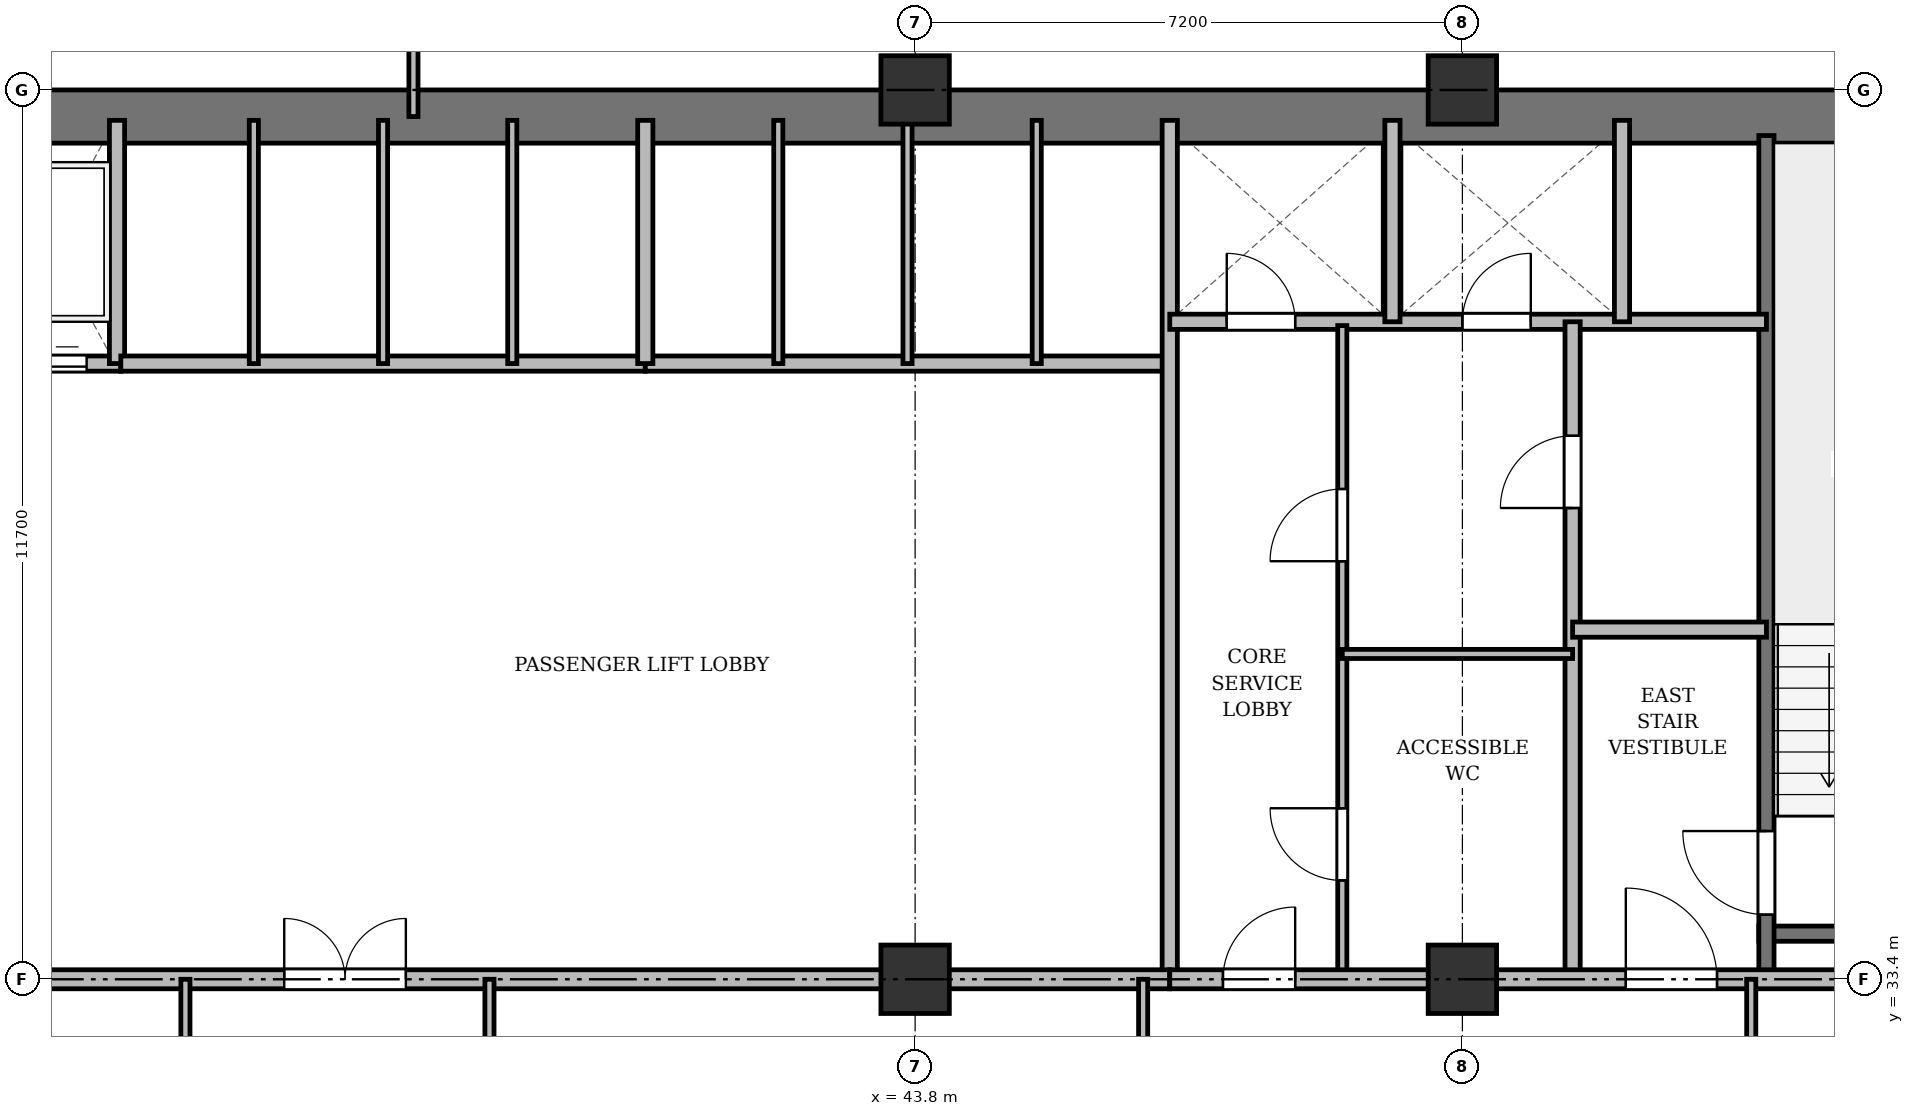
"""IFC4 building model, lengths in metres.
Left out: names, types, materials, properties, quantities, classifications, styles, units other than length and angle.
Written with IfcOpenShell. Run it as: python <this file> out.ifc"""

import sys

from ifc_helpers import new_model, si_unit, direction, frame, frame_2d, origin, origin_2d, place, context, subcontext, project, spatial, rectangle, extrude, source, transform, mapped, element, fill, save


model = new_model("IFC4")
c1 = context("Model", 3, precision=1e-05, world=origin(), true_north=direction((0.0, 1.0)))
c2 = subcontext(c1, "Body", "Model", "MODEL_VIEW")
j1 = project(units=[si_unit("LENGTHUNIT", "METRE"), si_unit("PLANEANGLEUNIT", "RADIAN")], contexts=[c1])
p1 = place(None, origin())
s1 = spatial("IfcSite", under=j1, at=p1, CompositionType="ELEMENT")
p2 = place(p1, origin())
s2 = spatial("IfcBuilding", under=s1, at=p2, CompositionType="ELEMENT")
p3 = place(p2, frame((0.0, 0.0, 66.7)))
s3 = spatial("IfcBuildingStorey", under=s2, at=p3, CompositionType="ELEMENT", Elevation=66.7)
m1 = source(origin(), c2, "Body", "SweptSolid", [
    extrude(rectangle(XDim=0.9, YDim=0.9, at=origin_2d()), origin(), (0.0, 0.0, 1.0), 3.6),
])
for number, where, z_axis, x_axis in (
    (1, (43.8, 33.4, 0.0), (0.0, 0.0, 1.0), (1.0, 0.0, 0.0)),
    (2, (43.8, 45.1, 0.0), (0.0, 0.0, 1.0), (1.0, 0.0, 0.0)),
    (3, (51.0, 33.4, 0.0), (0.0, 0.0, 1.0), (1.0, 0.0, 0.0)),
    (4, (51.0, 45.1, 0.0), (0.0, 0.0, 1.0), (1.0, 0.0, 0.0)),
):
    element("IfcColumn", number, at=place(p3, frame(where, z_axis=z_axis, x_axis=x_axis)), inside=s3, PredefinedType="COLUMN", context=c2, shape_type="MappedRepresentation", body=[
        mapped(m1, transform((0.0, 0.0, 0.0), x_axis=(1.0, 0.0, 0.0), y_axis=(0.0, 1.0, 0.0), z_axis=(0.0, 0.0, 1.0), scale=1.0)),
    ])
p4 = place(p3, frame((15.5, 44.75, 0.0), z_axis=(0.0, 0.0, 1.0), x_axis=(1.0, 0.0, 0.0)))
e5 = element("IfcWall", 5, at=p4, inside=s3, PredefinedType="SHEAR", context=c2, shape_type="SweptSolid", body=[
    extrude(rectangle(XDim=43.4, YDim=0.7, at=frame_2d((21.7, 0.0))), origin(), (0.0, 0.0, 1.0), 3.34),
])
p5 = place(p3, frame((54.9, 34.0, 0.0), z_axis=(0.0, 0.0, 1.0), x_axis=(1.0, 0.0, 0.0)))
e6 = element("IfcWall", 6, at=p5, inside=s3, PredefinedType="SHEAR", context=c2, shape_type="SweptSolid", body=[
    extrude(rectangle(XDim=3.4, YDim=0.2, at=frame_2d((1.7, 0.0))), origin(), (0.0, 0.0, 1.0), 3.34),
])
p6 = place(p3, frame((55.0, 33.4, 0.0), z_axis=(0.0, 0.0, 1.0), x_axis=(0.0, 1.0, 0.0)))
e7 = element("IfcWall", 7, at=p6, inside=s3, PredefinedType="SHEAR", context=c2, shape_type="SweptSolid", body=[
    extrude(rectangle(XDim=11.1, YDim=0.2, at=frame_2d((5.55, 0.0))), origin(), (0.0, 0.0, 1.0), 3.34),
])
p7 = place(p6, frame((0.85, 0.0, 0.0)))
e8 = element("IfcOpeningElement", 8, at=p7, cuts=e7, PredefinedType="OPENING", context=c2, shape_type="SweptSolid", body=[
    extrude(rectangle(XDim=1.1, YDim=2.15, at=frame_2d((0.55, 1.075))), frame((0.0, 0.11, 0.0), z_axis=(0.0, -1.0, 0.0), x_axis=(1.0, 0.0, 0.0)), (0.0, 0.0, 1.0), 0.22),
])
p8 = place(p3, frame((26.4, 41.5, 0.0), z_axis=(0.0, 0.0, 1.0), x_axis=(1.0, 0.0, 0.0)))
e9 = element("IfcWall", 9, at=p8, inside=s3, PredefinedType="SOLIDWALL", context=c2, shape_type="SweptSolid", body=[
    extrude(rectangle(XDim=6.95, YDim=0.2, at=frame_2d((3.475, 0.0))), origin(), (0.0, 0.0, 1.0), 3.34),
])
p9 = place(p8, frame((0.35, 0.0, 0.0)))
e10 = element("IfcOpeningElement", 10, at=p9, cuts=e9, PredefinedType="OPENING", context=c2, shape_type="SweptSolid", body=[
    extrude(rectangle(XDim=1.05, YDim=2.15, at=frame_2d((0.525, 1.075))), frame((0.0, 0.11, 0.0), z_axis=(0.0, -1.0, 0.0), x_axis=(1.0, 0.0, 0.0)), (0.0, 0.0, 1.0), 0.22),
])
p10 = place(p8, frame((2.05, 0.0, 0.0)))
e11 = element("IfcOpeningElement", 11, at=p10, cuts=e9, PredefinedType="OPENING", context=c2, shape_type="SweptSolid", body=[
    extrude(rectangle(XDim=1.05, YDim=2.15, at=frame_2d((0.525, 1.075))), frame((0.0, 0.11, 0.0), z_axis=(0.0, -1.0, 0.0), x_axis=(1.0, 0.0, 0.0)), (0.0, 0.0, 1.0), 0.22),
])
p11 = place(p8, frame((3.75, 0.0, 0.0)))
e12 = element("IfcOpeningElement", 12, at=p11, cuts=e9, PredefinedType="OPENING", context=c2, shape_type="SweptSolid", body=[
    extrude(rectangle(XDim=1.05, YDim=2.15, at=frame_2d((0.525, 1.075))), frame((0.0, 0.11, 0.0), z_axis=(0.0, -1.0, 0.0), x_axis=(1.0, 0.0, 0.0)), (0.0, 0.0, 1.0), 0.22),
])
p12 = place(p8, frame((5.45, 0.0, 0.0)))
e13 = element("IfcOpeningElement", 13, at=p12, cuts=e9, PredefinedType="OPENING", context=c2, shape_type="SweptSolid", body=[
    extrude(rectangle(XDim=1.05, YDim=2.15, at=frame_2d((0.525, 1.075))), frame((0.0, 0.11, 0.0), z_axis=(0.0, -1.0, 0.0), x_axis=(1.0, 0.0, 0.0)), (0.0, 0.0, 1.0), 0.22),
])
p13 = place(p3, frame((33.3, 41.5, 0.0), z_axis=(0.0, 0.0, 1.0), x_axis=(0.0, 1.0, 0.0)))
e14 = element("IfcWall", 14, at=p13, inside=s3, PredefinedType="SOLIDWALL", context=c2, shape_type="SweptSolid", body=[
    extrude(rectangle(XDim=3.2, YDim=0.2, at=frame_2d((1.6, 0.0))), origin(), (0.0, 0.0, 1.0), 3.34),
])
p14 = place(p3, frame((33.35, 41.5, 0.0), z_axis=(0.0, 0.0, 1.0), x_axis=(1.0, 0.0, 0.0)))
e15 = element("IfcWall", 15, at=p14, inside=s3, PredefinedType="SOLIDWALL", context=c2, shape_type="SweptSolid", body=[
    extrude(rectangle(XDim=6.9, YDim=0.2, at=frame_2d((3.45, 0.0))), origin(), (0.0, 0.0, 1.0), 3.34),
])
for number, where, z_axis, x_axis in (
    (16, (35.1, 41.5, 0.0), (0.0, 0.0, 1.0), (0.0, 1.0, 0.0)),
    (17, (36.8, 41.5, 0.0), (0.0, 0.0, 1.0), (0.0, 1.0, 0.0)),
    (18, (38.5, 41.5, 0.0), (0.0, 0.0, 1.0), (0.0, 1.0, 0.0)),
):
    element("IfcWall", number, at=place(p3, frame(where, z_axis=z_axis, x_axis=x_axis)), inside=s3, PredefinedType="PARTITIONING", context=c2, shape_type="SweptSolid", body=[
        extrude(rectangle(XDim=3.2, YDim=0.12, at=frame_2d((1.6, 0.0))), origin(), (0.0, 0.0, 1.0), 3.34),
    ])
p15 = place(p3, frame((40.25, 41.5, 0.0), z_axis=(0.0, 0.0, 1.0), x_axis=(1.0, 0.0, 0.0)))
e19 = element("IfcWall", 19, at=p15, inside=s3, PredefinedType="SOLIDWALL", context=c2, shape_type="SweptSolid", body=[
    extrude(rectangle(XDim=6.9, YDim=0.2, at=frame_2d((3.45, 0.0))), origin(), (0.0, 0.0, 1.0), 2.752),
])
p16 = place(p3, frame((40.25, 41.5, 0.0), z_axis=(0.0, 0.0, 1.0), x_axis=(0.0, 1.0, 0.0)))
e20 = element("IfcWall", 20, at=p16, inside=s3, PredefinedType="SOLIDWALL", context=c2, shape_type="SweptSolid", body=[
    extrude(rectangle(XDim=3.2, YDim=0.2, at=frame_2d((1.6, 0.0))), origin(), (0.0, 0.0, 1.0), 3.34),
])
p17 = place(p3, frame((42.0, 41.5, 0.0), z_axis=(0.0, 0.0, 1.0), x_axis=(0.0, 1.0, 0.0)))
e21 = element("IfcWall", 21, at=p17, inside=s3, PredefinedType="PARTITIONING", context=c2, shape_type="SweptSolid", body=[
    extrude(rectangle(XDim=3.2, YDim=0.12, at=frame_2d((1.6, 0.0))), origin(), (0.0, 0.0, 1.0), 3.34),
])
p18 = place(p3, frame((43.7, 41.5, 0.0), z_axis=(0.0, 0.0, 1.0), x_axis=(0.0, 1.0, 0.0)))
e22 = element("IfcWall", 22, at=p18, inside=s3, PredefinedType="PARTITIONING", context=c2, shape_type="SweptSolid", body=[
    extrude(rectangle(XDim=3.2, YDim=0.12, at=frame_2d((1.6, 0.0))), origin(), (0.0, 0.0, 1.0), 2.752),
])
p19 = place(p3, frame((45.4, 41.5, 0.0), z_axis=(0.0, 0.0, 1.0), x_axis=(0.0, 1.0, 0.0)))
e23 = element("IfcWall", 23, at=p19, inside=s3, PredefinedType="PARTITIONING", context=c2, shape_type="SweptSolid", body=[
    extrude(rectangle(XDim=3.2, YDim=0.12, at=frame_2d((1.6, 0.0))), origin(), (0.0, 0.0, 1.0), 3.34),
])
p20 = place(p3, frame((47.15, 33.4, 0.0), z_axis=(0.0, 0.0, 1.0), x_axis=(0.0, 1.0, 0.0)))
e24 = element("IfcWall", 24, at=p20, inside=s3, PredefinedType="SOLIDWALL", context=c2, shape_type="SweptSolid", body=[
    extrude(rectangle(XDim=11.3, YDim=0.2, at=frame_2d((5.65, 0.0))), origin(), (0.0, 0.0, 1.0), 2.69),
])
p21 = place(p3, frame((26.3, 33.4, 0.0), z_axis=(0.0, 0.0, 1.0), x_axis=(1.0, 0.0, 0.0)))
e25 = element("IfcWall", 25, at=p21, inside=s3, PredefinedType="PARTITIONING", context=c2, shape_type="SweptSolid", body=[
    extrude(rectangle(XDim=20.85, YDim=0.25, at=frame_2d((10.425, 0.0))), origin(), (0.0, 0.0, 1.0), 2.69),
])
p22 = place(p21, frame((9.2, 0.0, 0.0)))
e26 = element("IfcOpeningElement", 26, at=p22, cuts=e25, PredefinedType="OPENING", context=c2, shape_type="SweptSolid", body=[
    extrude(rectangle(XDim=1.6, YDim=2.2, at=frame_2d((0.8, 1.1))), frame((0.0, 0.135, 0.0), z_axis=(0.0, -1.0, 0.0), x_axis=(1.0, 0.0, 0.0)), (0.0, 0.0, 1.0), 0.27),
])
p23 = place(p3, frame((47.15, 42.05, 0.0), z_axis=(0.0, 0.0, 1.0), x_axis=(1.0, 0.0, 0.0)))
e27 = element("IfcWall", 27, at=p23, inside=s3, PredefinedType="SOLIDWALL", context=c2, shape_type="SweptSolid", body=[
    extrude(rectangle(XDim=7.85, YDim=0.2, at=frame_2d((3.925, 0.0))), origin(), (0.0, 0.0, 1.0), 2.752),
])
p24 = place(p23, frame((0.75, 0.0, 0.0)))
e28 = element("IfcOpeningElement", 28, at=p24, cuts=e27, PredefinedType="OPENING", context=c2, shape_type="SweptSolid", body=[
    extrude(rectangle(XDim=0.9, YDim=2.1, at=frame_2d((0.45, 1.05))), frame((0.0, 0.11, 0.0), z_axis=(0.0, -1.0, 0.0), x_axis=(1.0, 0.0, 0.0)), (0.0, 0.0, 1.0), 0.22),
])
p25 = place(p23, frame((3.85, 0.0, 0.0)))
e29 = element("IfcOpeningElement", 29, at=p25, cuts=e27, PredefinedType="OPENING", context=c2, shape_type="SweptSolid", body=[
    extrude(rectangle(XDim=0.9, YDim=2.1, at=frame_2d((0.45, 1.05))), frame((0.0, 0.11, 0.0), z_axis=(0.0, -1.0, 0.0), x_axis=(1.0, 0.0, 0.0)), (0.0, 0.0, 1.0), 0.22),
])
for number, where, z_axis, x_axis in (
    (30, (50.08, 42.05, 0.0), (0.0, 0.0, 1.0), (0.0, 1.0, 0.0)),
    (31, (53.1, 42.05, 0.0), (0.0, 0.0, 1.0), (0.0, 1.0, 0.0)),
):
    element("IfcWall", number, at=place(p3, frame(where, z_axis=z_axis, x_axis=x_axis)), inside=s3, PredefinedType="SOLIDWALL", context=c2, shape_type="SweptSolid", body=[
        extrude(rectangle(XDim=2.65, YDim=0.2, at=frame_2d((1.325, 0.0))), origin(), (0.0, 0.0, 1.0), 3.34),
    ])
p26 = place(p3, frame((52.45, 33.4, 0.0), z_axis=(0.0, 0.0, 1.0), x_axis=(0.0, 1.0, 0.0)))
e32 = element("IfcWall", 32, at=p26, inside=s3, PredefinedType="PARTITIONING", context=c2, shape_type="SweptSolid", body=[
    extrude(rectangle(XDim=8.65, YDim=0.2, at=frame_2d((4.325, 0.0))), origin(), (0.0, 0.0, 1.0), 2.69),
])
p27 = place(p26, frame((6.2, 0.0, 0.0)))
e33 = element("IfcOpeningElement", 33, at=p27, cuts=e32, PredefinedType="OPENING", context=c2, shape_type="SweptSolid", body=[
    extrude(rectangle(XDim=0.95, YDim=2.15, at=frame_2d((0.475, 1.075))), frame((0.0, 0.11, 0.0), z_axis=(0.0, -1.0, 0.0), x_axis=(1.0, 0.0, 0.0)), (0.0, 0.0, 1.0), 0.22),
])
p28 = place(p3, frame((52.45, 38.0, 0.0), z_axis=(0.0, 0.0, 1.0), x_axis=(1.0, 0.0, 0.0)))
e34 = element("IfcWall", 34, at=p28, inside=s3, PredefinedType="PARTITIONING", context=c2, shape_type="SweptSolid", body=[
    extrude(rectangle(XDim=2.55, YDim=0.2, at=frame_2d((1.275, 0.0))), origin(), (0.0, 0.0, 1.0), 3.34),
])
p29 = place(p3, frame((49.42, 33.4, 0.0), z_axis=(0.0, 0.0, 1.0), x_axis=(0.0, 1.0, 0.0)))
e35 = element("IfcWall", 35, at=p29, inside=s3, PredefinedType="PARTITIONING", context=c2, shape_type="SweptSolid", body=[
    extrude(rectangle(XDim=8.6, YDim=0.12, at=frame_2d((4.3, 0.0))), origin(), (0.0, 0.0, 1.0), 2.69),
])
p30 = place(p29, frame((1.3, 0.0, 0.0)))
e36 = element("IfcOpeningElement", 36, at=p30, cuts=e35, PredefinedType="OPENING", context=c2, shape_type="SweptSolid", body=[
    extrude(rectangle(XDim=0.95, YDim=2.15, at=frame_2d((0.475, 1.075))), frame((0.0, 0.07, 0.0), z_axis=(0.0, -1.0, 0.0), x_axis=(1.0, 0.0, 0.0)), (0.0, 0.0, 1.0), 0.14),
])
p31 = place(p29, frame((5.5, 0.0, 0.0)))
e37 = element("IfcOpeningElement", 37, at=p31, cuts=e35, PredefinedType="OPENING", context=c2, shape_type="SweptSolid", body=[
    extrude(rectangle(XDim=0.95, YDim=2.15, at=frame_2d((0.475, 1.075))), frame((0.0, 0.07, 0.0), z_axis=(0.0, -1.0, 0.0), x_axis=(1.0, 0.0, 0.0)), (0.0, 0.0, 1.0), 0.14),
])
p32 = place(p3, frame((49.42, 37.68, 0.0), z_axis=(0.0, 0.0, 1.0), x_axis=(1.0, 0.0, 0.0)))
e38 = element("IfcWall", 38, at=p32, inside=s3, PredefinedType="PARTITIONING", context=c2, shape_type="SweptSolid", body=[
    extrude(rectangle(XDim=3.03, YDim=0.12, at=frame_2d((1.515, 0.0))), origin(), (0.0, 0.0, 1.0), 2.752),
])
p33 = place(p3, frame((47.15, 33.4, 0.0), z_axis=(0.0, 0.0, 1.0), x_axis=(1.0, 0.0, 0.0)))
e39 = element("IfcWall", 39, at=p33, inside=s3, PredefinedType="PARTITIONING", context=c2, shape_type="SweptSolid", body=[
    extrude(rectangle(XDim=11.15, YDim=0.25, at=frame_2d((5.575, 0.0))), origin(), (0.0, 0.0, 1.0), 2.69),
])
p34 = place(p33, frame((0.7, 0.0, 0.0)))
e40 = element("IfcOpeningElement", 40, at=p34, cuts=e39, PredefinedType="OPENING", context=c2, shape_type="SweptSolid", body=[
    extrude(rectangle(XDim=0.95, YDim=2.15, at=frame_2d((0.475, 1.075))), frame((0.0, 0.135, 0.0), z_axis=(0.0, -1.0, 0.0), x_axis=(1.0, 0.0, 0.0)), (0.0, 0.0, 1.0), 0.27),
])
p35 = place(p33, frame((6.0, 0.0, 0.0)))
e41 = element("IfcOpeningElement", 41, at=p35, cuts=e39, PredefinedType="OPENING", context=c2, shape_type="SweptSolid", body=[
    extrude(rectangle(XDim=1.2, YDim=2.15, at=frame_2d((0.6, 1.075))), frame((0.0, 0.135, 0.0), z_axis=(0.0, -1.0, 0.0), x_axis=(1.0, 0.0, 0.0)), (0.0, 0.0, 1.0), 0.27),
])
for number, where, z_axis, x_axis in (
    (42, (34.2, 29.8, 0.0), (0.0, 0.0, 1.0), (0.0, 1.0, 0.0)),
    (43, (38.2, 29.8, 0.0), (0.0, 0.0, 1.0), (0.0, 1.0, 0.0)),
    (44, (46.8, 29.8, 0.0), (0.0, 0.0, 1.0), (0.0, 1.0, 0.0)),
    (45, (54.8, 29.8, 0.0), (0.0, 0.0, 1.0), (0.0, 1.0, 0.0)),
):
    element("IfcWall", number, at=place(p3, frame(where, z_axis=z_axis, x_axis=x_axis)), inside=s3, PredefinedType="PARTITIONING", context=c2, shape_type="SweptSolid", body=[
        extrude(rectangle(XDim=3.6, YDim=0.12, at=frame_2d((1.8, 0.0))), origin(), (0.0, 0.0, 1.0), 2.69),
    ])
p36 = place(p3, frame((37.2, 44.75, 0.0), z_axis=(0.0, 0.0, 1.0), x_axis=(0.0, 1.0, 0.0)))
e46 = element("IfcWall", 46, at=p36, inside=s3, PredefinedType="PARTITIONING", context=c2, shape_type="SweptSolid", body=[
    extrude(rectangle(XDim=3.61, YDim=0.12, at=frame_2d((1.805, 0.0))), origin(), (0.0, 0.0, 1.0), 2.69),
])
p37 = place(p36, frame((1.1, 0.0, 0.0)))
e47 = element("IfcOpeningElement", 47, at=p37, cuts=e46, PredefinedType="OPENING", context=c2, shape_type="SweptSolid", body=[
    extrude(rectangle(XDim=0.95, YDim=2.15, at=frame_2d((0.475, 1.075))), frame((0.0, 0.07, 0.0), z_axis=(0.0, -1.0, 0.0), x_axis=(1.0, 0.0, 0.0)), (0.0, 0.0, 1.0), 0.14),
])
m2 = source(origin(), c2, "Body", "SweptSolid", [
    extrude(rectangle(XDim=1.1, YDim=2.15, at=frame_2d((0.55, 1.075))), frame((0.0, 0.025, 0.0), z_axis=(0.0, -1.0, 0.0), x_axis=(1.0, 0.0, 0.0)), (0.0, 0.0, 1.0), 0.05),
])
p38 = place(p7, origin())
e48 = element("IfcDoor", 48, at=p38, inside=s3, OperationType="SINGLE_SWING_RIGHT", PredefinedType="DOOR", context=c2, shape_type="MappedRepresentation", body=[
    mapped(m2, transform((0.0, 0.0, 0.0), x_axis=(1.0, 0.0, 0.0), y_axis=(0.0, 1.0, 0.0), z_axis=(0.0, 0.0, 1.0), scale=1.0)),
])
fill(e8, e48)
m3 = source(origin(), c2, "Body", "SweptSolid", [
    extrude(rectangle(XDim=1.05, YDim=2.15, at=frame_2d((0.525, 1.075))), frame((0.0, 0.025, 0.0), z_axis=(0.0, -1.0, 0.0), x_axis=(1.0, 0.0, 0.0)), (0.0, 0.0, 1.0), 0.05),
])
p39 = place(p12, origin())
e49 = element("IfcDoor", 49, at=p39, inside=s3, OperationType="DOUBLE_DOOR_SLIDING", PredefinedType="DOOR", context=c2, shape_type="MappedRepresentation", body=[
    mapped(m3, transform((0.0, 0.0, 0.0), x_axis=(1.0, 0.0, 0.0), y_axis=(0.0, 1.0, 0.0), z_axis=(0.0, 0.0, 1.0), scale=1.0)),
])
fill(e13, e49)
m4 = source(origin(), c2, "Body", "SweptSolid", [
    extrude(rectangle(XDim=1.6, YDim=2.2, at=frame_2d((0.8, 1.1))), frame((0.0, 0.025, 0.0), z_axis=(0.0, -1.0, 0.0), x_axis=(1.0, 0.0, 0.0)), (0.0, 0.0, 1.0), 0.05),
])
p40 = place(p22, origin())
e50 = element("IfcDoor", 50, at=p40, inside=s3, OperationType="DOUBLE_DOOR_SINGLE_SWING", PredefinedType="DOOR", context=c2, shape_type="MappedRepresentation", body=[
    mapped(m4, transform((0.0, 0.0, 0.0), x_axis=(1.0, 0.0, 0.0), y_axis=(0.0, 1.0, 0.0), z_axis=(0.0, 0.0, 1.0), scale=1.0)),
])
fill(e26, e50)
m5 = source(origin(), c2, "Body", "SweptSolid", [
    extrude(rectangle(XDim=0.9, YDim=2.1, at=frame_2d((0.45, 1.05))), frame((0.0, 0.025, 0.0), z_axis=(0.0, -1.0, 0.0), x_axis=(1.0, 0.0, 0.0)), (0.0, 0.0, 1.0), 0.05),
])
p41 = place(p24, origin())
e51 = element("IfcDoor", 51, at=p41, inside=s3, OperationType="SINGLE_SWING_LEFT", PredefinedType="DOOR", context=c2, shape_type="MappedRepresentation", body=[
    mapped(m5, transform((0.0, 0.0, 0.0), x_axis=(1.0, 0.0, 0.0), y_axis=(0.0, 1.0, 0.0), z_axis=(0.0, 0.0, 1.0), scale=1.0)),
])
fill(e28, e51)
p42 = place(p25, origin())
e52 = element("IfcDoor", 52, at=p42, inside=s3, OperationType="SINGLE_SWING_RIGHT", PredefinedType="DOOR", context=c2, shape_type="MappedRepresentation", body=[
    mapped(m5, transform((0.0, 0.0, 0.0), x_axis=(1.0, 0.0, 0.0), y_axis=(0.0, 1.0, 0.0), z_axis=(0.0, 0.0, 1.0), scale=1.0)),
])
fill(e29, e52)
m6 = source(origin(), c2, "Body", "SweptSolid", [
    extrude(rectangle(XDim=0.95, YDim=2.15, at=frame_2d((0.475, 1.075))), frame((0.0, 0.025, 0.0), z_axis=(0.0, -1.0, 0.0), x_axis=(1.0, 0.0, 0.0)), (0.0, 0.0, 1.0), 0.05),
])
p43 = place(p27, origin())
e53 = element("IfcDoor", 53, at=p43, inside=s3, OperationType="SINGLE_SWING_LEFT", PredefinedType="DOOR", context=c2, shape_type="MappedRepresentation", body=[
    mapped(m6, transform((0.0, 0.0, 0.0), x_axis=(1.0, 0.0, 0.0), y_axis=(0.0, 1.0, 0.0), z_axis=(0.0, 0.0, 1.0), scale=1.0)),
])
fill(e33, e53)
p44 = place(p30, origin())
e54 = element("IfcDoor", 54, at=p44, inside=s3, OperationType="SINGLE_SWING_RIGHT", PredefinedType="DOOR", context=c2, shape_type="MappedRepresentation", body=[
    mapped(m6, transform((0.0, 0.0, 0.0), x_axis=(1.0, 0.0, 0.0), y_axis=(0.0, 1.0, 0.0), z_axis=(0.0, 0.0, 1.0), scale=1.0)),
])
fill(e36, e54)
p45 = place(p31, origin())
e55 = element("IfcDoor", 55, at=p45, inside=s3, OperationType="SINGLE_SWING_LEFT", PredefinedType="DOOR", context=c2, shape_type="MappedRepresentation", body=[
    mapped(m6, transform((0.0, 0.0, 0.0), x_axis=(1.0, 0.0, 0.0), y_axis=(0.0, 1.0, 0.0), z_axis=(0.0, 0.0, 1.0), scale=1.0)),
])
fill(e37, e55)
p46 = place(p34, origin())
e56 = element("IfcDoor", 56, at=p46, inside=s3, OperationType="SINGLE_SWING_RIGHT", PredefinedType="DOOR", context=c2, shape_type="MappedRepresentation", body=[
    mapped(m6, transform((0.0, 0.0, 0.0), x_axis=(1.0, 0.0, 0.0), y_axis=(0.0, 1.0, 0.0), z_axis=(0.0, 0.0, 1.0), scale=1.0)),
])
fill(e40, e56)
m7 = source(origin(), c2, "Body", "SweptSolid", [
    extrude(rectangle(XDim=1.2, YDim=2.15, at=frame_2d((0.6, 1.075))), frame((0.0, 0.025, 0.0), z_axis=(0.0, -1.0, 0.0), x_axis=(1.0, 0.0, 0.0)), (0.0, 0.0, 1.0), 0.05),
])
p47 = place(p35, origin())
e57 = element("IfcDoor", 57, at=p47, inside=s3, OperationType="SINGLE_SWING_LEFT", PredefinedType="DOOR", context=c2, shape_type="MappedRepresentation", body=[
    mapped(m7, transform((0.0, 0.0, 0.0), x_axis=(1.0, 0.0, 0.0), y_axis=(0.0, 1.0, 0.0), z_axis=(0.0, 0.0, 1.0), scale=1.0)),
])
fill(e41, e57)
save(model, sys.argv[1])
